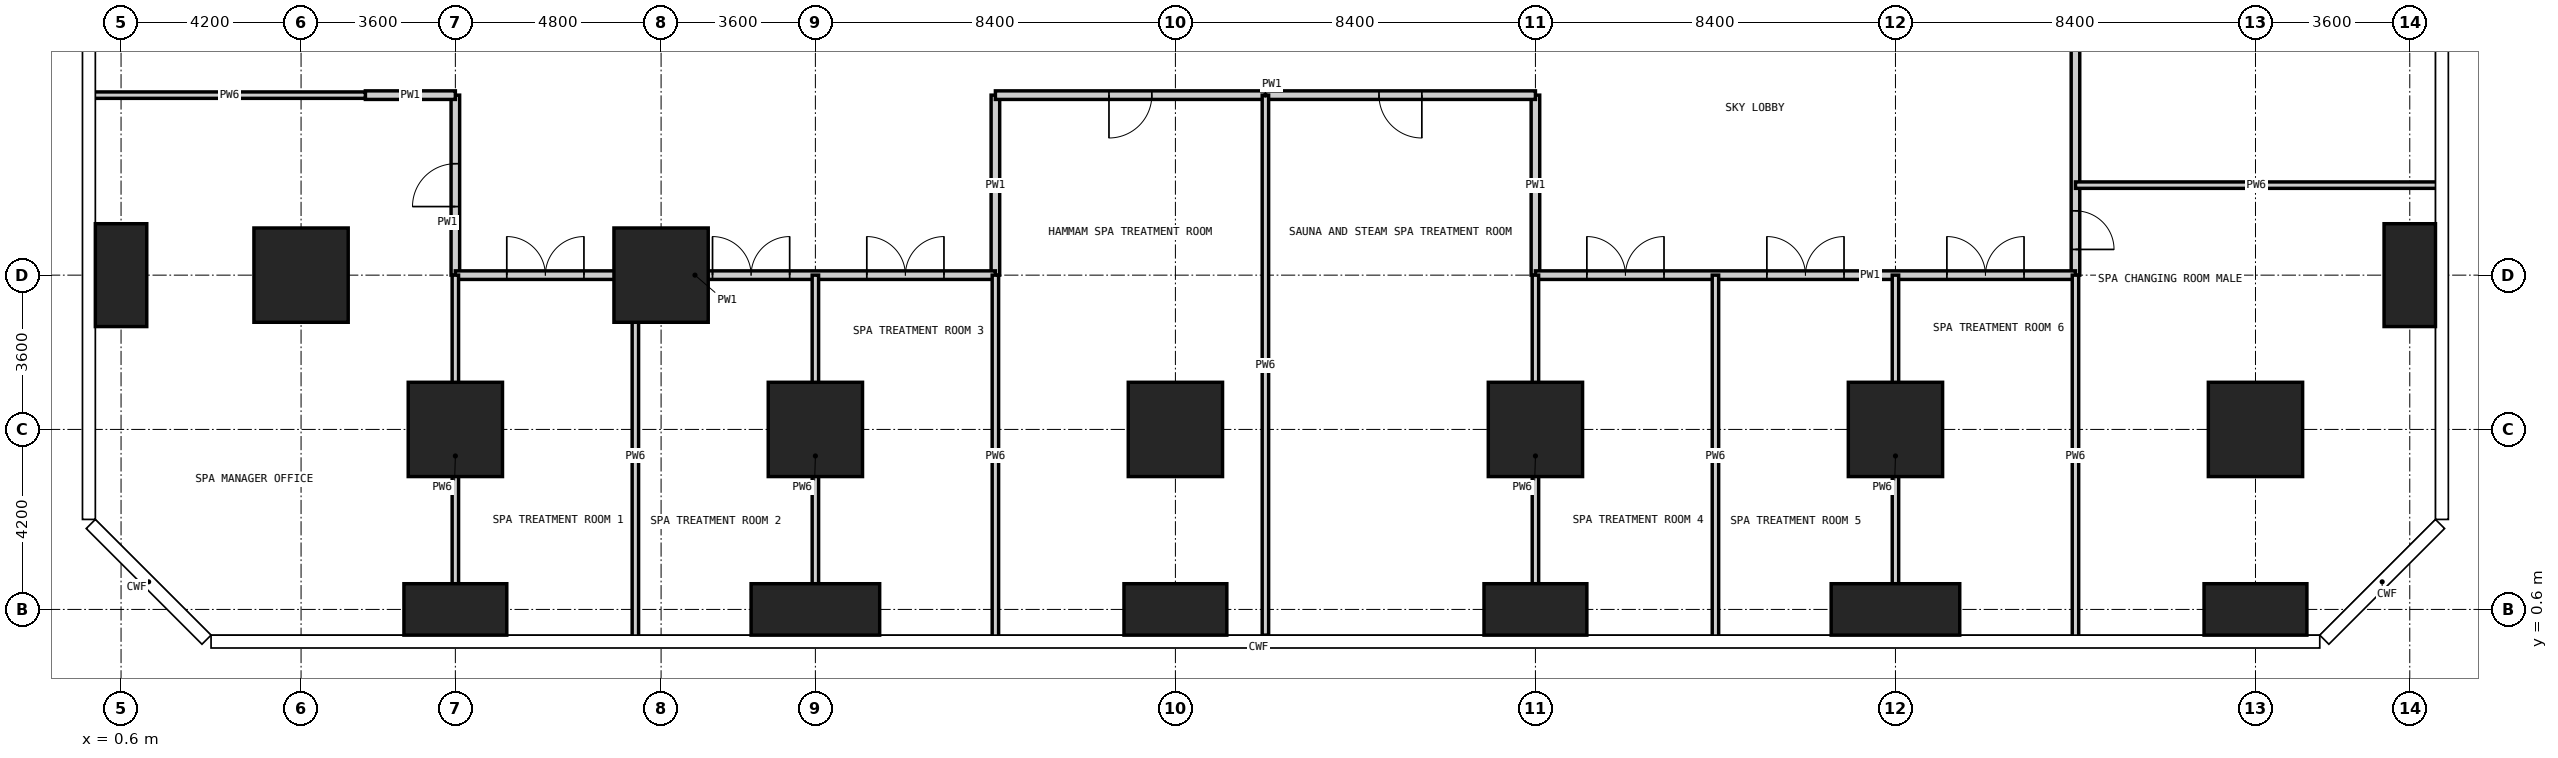
"""IFC4 building model, lengths in metres.
Left out: names, types, materials, properties, quantities, classifications, styles, units other than length and angle.
Written with IfcOpenShell. Run it as: python <this file> out.ifc"""

import sys

from ifc_helpers import new_model, si_unit, direction, frame, frame_2d, origin, origin_2d, place, context, subcontext, project, spatial, rectangle, extrude, element, fill, save


model = new_model("IFC4")
c1 = context("Model", 3, precision=1e-05, world=origin(), true_north=direction((0.0, 1.0)))
c2 = subcontext(c1, "Body", "Model", "MODEL_VIEW")
j1 = project(units=[si_unit("LENGTHUNIT", "METRE"), si_unit("PLANEANGLEUNIT", "RADIAN")], contexts=[c1])
p1 = place(None, origin())
s1 = spatial("IfcSite", under=j1, at=p1, CompositionType="ELEMENT")
p2 = place(p1, origin())
s2 = spatial("IfcBuilding", under=s1, at=p2, CompositionType="ELEMENT")
p3 = place(p2, frame((0.0, 0.0, 147.6)))
s3 = spatial("IfcBuildingStorey", under=s2, at=p3, CompositionType="ELEMENT", Elevation=147.6)
p4 = place(p3, frame((0.6, 8.4, -0.35), z_axis=(0.0, 0.0, 1.0), x_axis=(1.0, 0.0, 0.0)))
e1 = element("IfcColumn", 1, at=p4, inside=s3, PredefinedType="COLUMN", context=c2, shape_type="SweptSolid", body=[
    extrude(rectangle(XDim=1.2, YDim=2.4, at=origin_2d()), origin(), (0.0, 0.0, 1.0), 5.95),
])
p5 = place(p3, frame((4.8, 8.4, -0.35), z_axis=(0.0, 0.0, 1.0), x_axis=(1.0, 0.0, 0.0)))
e2 = element("IfcColumn", 2, at=p5, inside=s3, PredefinedType="COLUMN", context=c2, shape_type="SweptSolid", body=[
    extrude(rectangle(XDim=2.2, YDim=2.2, at=origin_2d()), origin(), (0.0, 0.0, 1.0), 5.95),
])
p6 = place(p3, frame((8.4, 0.6, -0.35), z_axis=(0.0, 0.0, 1.0), x_axis=(1.0, 0.0, 0.0)))
e3 = element("IfcColumn", 3, at=p6, inside=s3, PredefinedType="COLUMN", context=c2, shape_type="SweptSolid", body=[
    extrude(rectangle(XDim=2.4, YDim=1.2, at=origin_2d()), origin(), (0.0, 0.0, 1.0), 5.95),
])
for number, where, z_axis, x_axis in (
    (4, (8.4, 4.8, -0.35), (0.0, 0.0, 1.0), (1.0, 0.0, 0.0)),
    (5, (13.2, 8.4, -0.35), (0.0, 0.0, 1.0), (1.0, 0.0, 0.0)),
):
    element("IfcColumn", number, at=place(p3, frame(where, z_axis=z_axis, x_axis=x_axis)), inside=s3, PredefinedType="COLUMN", context=c2, shape_type="SweptSolid", body=[
        extrude(rectangle(XDim=2.2, YDim=2.2, at=origin_2d()), origin(), (0.0, 0.0, 1.0), 5.95),
    ])
p7 = place(p3, frame((16.8, 0.6, -0.35), z_axis=(0.0, 0.0, 1.0), x_axis=(1.0, 0.0, 0.0)))
e6 = element("IfcColumn", 6, at=p7, inside=s3, PredefinedType="COLUMN", context=c2, shape_type="SweptSolid", body=[
    extrude(rectangle(XDim=3.0, YDim=1.2, at=origin_2d()), origin(), (0.0, 0.0, 1.0), 5.95),
])
p8 = place(p3, frame((16.8, 4.8, -0.35), z_axis=(0.0, 0.0, 1.0), x_axis=(1.0, 0.0, 0.0)))
e7 = element("IfcColumn", 7, at=p8, inside=s3, PredefinedType="COLUMN", context=c2, shape_type="SweptSolid", body=[
    extrude(rectangle(XDim=2.2, YDim=2.2, at=origin_2d()), origin(), (0.0, 0.0, 1.0), 5.95),
])
p9 = place(p3, frame((25.2, 0.6, -0.35), z_axis=(0.0, 0.0, 1.0), x_axis=(1.0, 0.0, 0.0)))
e8 = element("IfcColumn", 8, at=p9, inside=s3, PredefinedType="COLUMN", context=c2, shape_type="SweptSolid", body=[
    extrude(rectangle(XDim=2.4, YDim=1.2, at=origin_2d()), origin(), (0.0, 0.0, 1.0), 5.95),
])
p10 = place(p3, frame((25.2, 4.8, -0.35), z_axis=(0.0, 0.0, 1.0), x_axis=(1.0, 0.0, 0.0)))
e9 = element("IfcColumn", 9, at=p10, inside=s3, PredefinedType="COLUMN", context=c2, shape_type="SweptSolid", body=[
    extrude(rectangle(XDim=2.2, YDim=2.2, at=origin_2d()), origin(), (0.0, 0.0, 1.0), 5.95),
])
p11 = place(p3, frame((33.6, 0.6, -0.35), z_axis=(0.0, 0.0, 1.0), x_axis=(1.0, 0.0, 0.0)))
e10 = element("IfcColumn", 10, at=p11, inside=s3, PredefinedType="COLUMN", context=c2, shape_type="SweptSolid", body=[
    extrude(rectangle(XDim=2.4, YDim=1.2, at=origin_2d()), origin(), (0.0, 0.0, 1.0), 5.95),
])
p12 = place(p3, frame((33.6, 4.8, -0.35), z_axis=(0.0, 0.0, 1.0), x_axis=(1.0, 0.0, 0.0)))
e11 = element("IfcColumn", 11, at=p12, inside=s3, PredefinedType="COLUMN", context=c2, shape_type="SweptSolid", body=[
    extrude(rectangle(XDim=2.2, YDim=2.2, at=origin_2d()), origin(), (0.0, 0.0, 1.0), 5.95),
])
p13 = place(p3, frame((42.0, 0.6, -0.35), z_axis=(0.0, 0.0, 1.0), x_axis=(1.0, 0.0, 0.0)))
e12 = element("IfcColumn", 12, at=p13, inside=s3, PredefinedType="COLUMN", context=c2, shape_type="SweptSolid", body=[
    extrude(rectangle(XDim=3.0, YDim=1.2, at=origin_2d()), origin(), (0.0, 0.0, 1.0), 5.95),
])
p14 = place(p3, frame((42.0, 4.8, -0.35), z_axis=(0.0, 0.0, 1.0), x_axis=(1.0, 0.0, 0.0)))
e13 = element("IfcColumn", 13, at=p14, inside=s3, PredefinedType="COLUMN", context=c2, shape_type="SweptSolid", body=[
    extrude(rectangle(XDim=2.2, YDim=2.2, at=origin_2d()), origin(), (0.0, 0.0, 1.0), 5.95),
])
p15 = place(p3, frame((50.4, 0.6, -0.35), z_axis=(0.0, 0.0, 1.0), x_axis=(1.0, 0.0, 0.0)))
e14 = element("IfcColumn", 14, at=p15, inside=s3, PredefinedType="COLUMN", context=c2, shape_type="SweptSolid", body=[
    extrude(rectangle(XDim=2.4, YDim=1.2, at=origin_2d()), origin(), (0.0, 0.0, 1.0), 5.95),
])
p16 = place(p3, frame((50.4, 4.8, -0.35), z_axis=(0.0, 0.0, 1.0), x_axis=(1.0, 0.0, 0.0)))
e15 = element("IfcColumn", 15, at=p16, inside=s3, PredefinedType="COLUMN", context=c2, shape_type="SweptSolid", body=[
    extrude(rectangle(XDim=2.2, YDim=2.2, at=origin_2d()), origin(), (0.0, 0.0, 1.0), 5.95),
])
p17 = place(p3, frame((54.0, 8.4, -0.35), z_axis=(0.0, 0.0, 1.0), x_axis=(1.0, 0.0, 0.0)))
e16 = element("IfcColumn", 16, at=p17, inside=s3, PredefinedType="COLUMN", context=c2, shape_type="SweptSolid", body=[
    extrude(rectangle(XDim=1.2, YDim=2.4, at=origin_2d()), origin(), (0.0, 0.0, 1.0), 5.95),
])
p18 = place(p3, frame((8.4, 8.4, 0.0), z_axis=(0.0, 0.0, 1.0), x_axis=(0.0, 1.0, 0.0)))
e17 = element("IfcWall", 17, at=p18, inside=s3, PredefinedType="PARTITIONING", context=c2, shape_type="SweptSolid", body=[
    extrude(rectangle(XDim=4.2, YDim=0.2, at=frame_2d((2.1, 0.0))), origin(), (0.0, 0.0, 1.0), 5.6),
])
p19 = place(p18, frame((1.6, 0.0, 0.0)))
e18 = element("IfcOpeningElement", 18, at=p19, cuts=e17, PredefinedType="OPENING", context=c2, shape_type="SweptSolid", body=[
    extrude(rectangle(XDim=1.0, YDim=2.1, at=frame_2d((0.5, 1.05))), frame((0.0, 0.11, 0.0), z_axis=(0.0, -1.0, 0.0), x_axis=(1.0, 0.0, 0.0)), (0.0, 0.0, 1.0), 0.22),
])
for number, where, z_axis, x_axis in (
    (19, (21.0, 8.4, 0.0), (0.0, 0.0, 1.0), (0.0, 1.0, 0.0)),
    (20, (33.6, 8.4, 0.0), (0.0, 0.0, 1.0), (0.0, 1.0, 0.0)),
):
    element("IfcWall", number, at=place(p3, frame(where, z_axis=z_axis, x_axis=x_axis)), inside=s3, PredefinedType="PARTITIONING", context=c2, shape_type="SweptSolid", body=[
        extrude(rectangle(XDim=4.2, YDim=0.2, at=frame_2d((2.1, 0.0))), origin(), (0.0, 0.0, 1.0), 5.6),
    ])
p20 = place(p3, frame((46.2, 8.4, 0.0), z_axis=(0.0, 0.0, 1.0), x_axis=(0.0, 1.0, 0.0)))
e21 = element("IfcWall", 21, at=p20, inside=s3, PredefinedType="PARTITIONING", context=c2, shape_type="SweptSolid", body=[
    extrude(rectangle(XDim=29.4, YDim=0.2, at=frame_2d((14.7, 0.0))), origin(), (0.0, 0.0, 1.0), 5.6),
])
p21 = place(p20, frame((0.6, 0.0, 0.0)))
e22 = element("IfcOpeningElement", 22, at=p21, cuts=e21, PredefinedType="OPENING", context=c2, shape_type="SweptSolid", body=[
    extrude(rectangle(XDim=0.9, YDim=2.1, at=frame_2d((0.45, 1.05))), frame((0.0, 0.11, 0.0), z_axis=(0.0, -1.0, 0.0), x_axis=(1.0, 0.0, 0.0)), (0.0, 0.0, 1.0), 0.22),
])
p22 = place(p20, frame((6.9, 0.0, 0.0)))
e23 = element("IfcOpeningElement", 23, at=p22, cuts=e21, PredefinedType="OPENING", context=c2, shape_type="SweptSolid", body=[
    extrude(rectangle(XDim=0.9, YDim=2.1, at=frame_2d((0.45, 1.05))), frame((0.0, 0.11, 0.0), z_axis=(0.0, -1.0, 0.0), x_axis=(1.0, 0.0, 0.0)), (0.0, 0.0, 1.0), 0.22),
])
p23 = place(p20, frame((18.4, 0.0, 0.0)))
e24 = element("IfcOpeningElement", 24, at=p23, cuts=e21, PredefinedType="OPENING", context=c2, shape_type="SweptSolid", body=[
    extrude(rectangle(XDim=1.0, YDim=2.1, at=frame_2d((0.5, 1.05))), frame((0.0, 0.11, 0.0), z_axis=(0.0, -1.0, 0.0), x_axis=(1.0, 0.0, 0.0)), (0.0, 0.0, 1.0), 0.22),
])
p24 = place(p20, frame((26.8, 0.0, 0.0)))
e25 = element("IfcOpeningElement", 25, at=p24, cuts=e21, PredefinedType="OPENING", context=c2, shape_type="SweptSolid", body=[
    extrude(rectangle(XDim=1.0, YDim=2.1, at=frame_2d((0.5, 1.05))), frame((0.0, 0.11, 0.0), z_axis=(0.0, -1.0, 0.0), x_axis=(1.0, 0.0, 0.0)), (0.0, 0.0, 1.0), 0.22),
])
p25 = place(p3, frame((8.4, 8.4, 0.0), z_axis=(0.0, 0.0, 1.0), x_axis=(1.0, 0.0, 0.0)))
e26 = element("IfcWall", 26, at=p25, inside=s3, PredefinedType="PARTITIONING", context=c2, shape_type="SweptSolid", body=[
    extrude(rectangle(XDim=12.6, YDim=0.2, at=frame_2d((6.3, 0.0))), origin(), (0.0, 0.0, 1.0), 5.6),
])
p26 = place(p25, frame((1.2, 0.0, 0.0)))
e27 = element("IfcOpeningElement", 27, at=p26, cuts=e26, PredefinedType="OPENING", context=c2, shape_type="SweptSolid", body=[
    extrude(rectangle(XDim=1.8, YDim=2.4, at=frame_2d((0.9, 1.2))), frame((0.0, 0.11, 0.0), z_axis=(0.0, -1.0, 0.0), x_axis=(1.0, 0.0, 0.0)), (0.0, 0.0, 1.0), 0.22),
])
p27 = place(p25, frame((6.0, 0.0, 0.0)))
e28 = element("IfcOpeningElement", 28, at=p27, cuts=e26, PredefinedType="OPENING", context=c2, shape_type="SweptSolid", body=[
    extrude(rectangle(XDim=1.8, YDim=2.4, at=frame_2d((0.9, 1.2))), frame((0.0, 0.11, 0.0), z_axis=(0.0, -1.0, 0.0), x_axis=(1.0, 0.0, 0.0)), (0.0, 0.0, 1.0), 0.22),
])
p28 = place(p25, frame((9.6, 0.0, 0.0)))
e29 = element("IfcOpeningElement", 29, at=p28, cuts=e26, PredefinedType="OPENING", context=c2, shape_type="SweptSolid", body=[
    extrude(rectangle(XDim=1.8, YDim=2.4, at=frame_2d((0.9, 1.2))), frame((0.0, 0.11, 0.0), z_axis=(0.0, -1.0, 0.0), x_axis=(1.0, 0.0, 0.0)), (0.0, 0.0, 1.0), 0.22),
])
p29 = place(p3, frame((33.6, 8.4, 0.0), z_axis=(0.0, 0.0, 1.0), x_axis=(1.0, 0.0, 0.0)))
e30 = element("IfcWall", 30, at=p29, inside=s3, PredefinedType="PARTITIONING", context=c2, shape_type="SweptSolid", body=[
    extrude(rectangle(XDim=12.6, YDim=0.2, at=frame_2d((6.3, 0.0))), origin(), (0.0, 0.0, 1.0), 5.6),
])
p30 = place(p29, frame((1.2, 0.0, 0.0)))
e31 = element("IfcOpeningElement", 31, at=p30, cuts=e30, PredefinedType="OPENING", context=c2, shape_type="SweptSolid", body=[
    extrude(rectangle(XDim=1.8, YDim=2.4, at=frame_2d((0.9, 1.2))), frame((0.0, 0.11, 0.0), z_axis=(0.0, -1.0, 0.0), x_axis=(1.0, 0.0, 0.0)), (0.0, 0.0, 1.0), 0.22),
])
p31 = place(p29, frame((5.4, 0.0, 0.0)))
e32 = element("IfcOpeningElement", 32, at=p31, cuts=e30, PredefinedType="OPENING", context=c2, shape_type="SweptSolid", body=[
    extrude(rectangle(XDim=1.8, YDim=2.4, at=frame_2d((0.9, 1.2))), frame((0.0, 0.11, 0.0), z_axis=(0.0, -1.0, 0.0), x_axis=(1.0, 0.0, 0.0)), (0.0, 0.0, 1.0), 0.22),
])
p32 = place(p29, frame((9.6, 0.0, 0.0)))
e33 = element("IfcOpeningElement", 33, at=p32, cuts=e30, PredefinedType="OPENING", context=c2, shape_type="SweptSolid", body=[
    extrude(rectangle(XDim=1.8, YDim=2.4, at=frame_2d((0.9, 1.2))), frame((0.0, 0.11, 0.0), z_axis=(0.0, -1.0, 0.0), x_axis=(1.0, 0.0, 0.0)), (0.0, 0.0, 1.0), 0.22),
])
p33 = place(p3, frame((6.3, 12.6, 0.0), z_axis=(0.0, 0.0, 1.0), x_axis=(1.0, 0.0, 0.0)))
e34 = element("IfcWall", 34, at=p33, inside=s3, PredefinedType="PARTITIONING", context=c2, shape_type="SweptSolid", body=[
    extrude(rectangle(XDim=2.1, YDim=0.2, at=frame_2d((1.05, 0.0))), origin(), (0.0, 0.0, 1.0), 5.6),
])
p34 = place(p3, frame((21.0, 12.6, 0.0), z_axis=(0.0, 0.0, 1.0), x_axis=(1.0, 0.0, 0.0)))
e35 = element("IfcWall", 35, at=p34, inside=s3, PredefinedType="PARTITIONING", context=c2, shape_type="SweptSolid", body=[
    extrude(rectangle(XDim=12.6, YDim=0.2, at=frame_2d((6.3, 0.0))), origin(), (0.0, 0.0, 1.0), 5.6),
])
p35 = place(p34, frame((2.65, 0.0, 0.0)))
e36 = element("IfcOpeningElement", 36, at=p35, cuts=e35, PredefinedType="OPENING", context=c2, shape_type="SweptSolid", body=[
    extrude(rectangle(XDim=1.0, YDim=2.1, at=frame_2d((0.5, 1.05))), frame((0.0, 0.11, 0.0), z_axis=(0.0, -1.0, 0.0), x_axis=(1.0, 0.0, 0.0)), (0.0, 0.0, 1.0), 0.22),
])
p36 = place(p34, frame((8.95, 0.0, 0.0)))
e37 = element("IfcOpeningElement", 37, at=p36, cuts=e35, PredefinedType="OPENING", context=c2, shape_type="SweptSolid", body=[
    extrude(rectangle(XDim=1.0, YDim=2.1, at=frame_2d((0.5, 1.05))), frame((0.0, 0.11, 0.0), z_axis=(0.0, -1.0, 0.0), x_axis=(1.0, 0.0, 0.0)), (0.0, 0.0, 1.0), 0.22),
])
for number, where, z_axis, x_axis in (
    (38, (8.4, -0.038, 0.0), (0.0, 0.0, 1.0), (0.0, 1.0, 0.0)),
    (39, (12.6, -0.038, 0.0), (0.0, 0.0, 1.0), (0.0, 1.0, 0.0)),
    (40, (16.8, -0.038, 0.0), (0.0, 0.0, 1.0), (0.0, 1.0, 0.0)),
    (41, (21.0, -0.038, 0.0), (0.0, 0.0, 1.0), (0.0, 1.0, 0.0)),
):
    element("IfcWall", number, at=place(p3, frame(where, z_axis=z_axis, x_axis=x_axis)), inside=s3, PredefinedType="PARTITIONING", context=c2, shape_type="SweptSolid", body=[
        extrude(rectangle(XDim=8.438, YDim=0.15, at=frame_2d((4.219, 0.0))), origin(), (0.0, 0.0, 1.0), 5.6),
    ])
p37 = place(p3, frame((27.3, 0.0, 0.0), z_axis=(0.0, 0.0, 1.0), x_axis=(0.0, 1.0, 0.0)))
e42 = element("IfcWall", 42, at=p37, inside=s3, PredefinedType="PARTITIONING", context=c2, shape_type="SweptSolid", body=[
    extrude(rectangle(XDim=12.6, YDim=0.15, at=frame_2d((6.3, 0.0))), origin(), (0.0, 0.0, 1.0), 5.6),
])
for number, where, z_axis, x_axis in (
    (43, (33.6, -0.038, 0.0), (0.0, 0.0, 1.0), (0.0, 1.0, 0.0)),
    (44, (37.8, -0.038, 0.0), (0.0, 0.0, 1.0), (0.0, 1.0, 0.0)),
    (45, (42.0, -0.038, 0.0), (0.0, 0.0, 1.0), (0.0, 1.0, 0.0)),
    (46, (46.2, -0.038, 0.0), (0.0, 0.0, 1.0), (0.0, 1.0, 0.0)),
    (47, (46.2, 10.5, 0.0), (0.0, 0.0, 1.0), (1.0, 0.0, 0.0)),
):
    element("IfcWall", number, at=place(p3, frame(where, z_axis=z_axis, x_axis=x_axis)), inside=s3, PredefinedType="PARTITIONING", context=c2, shape_type="SweptSolid", body=[
        extrude(rectangle(XDim=8.438, YDim=0.15, at=frame_2d((4.219, 0.0))), origin(), (0.0, 0.0, 1.0), 5.6),
    ])
p38 = place(p3, frame((-0.038, 12.6, 0.0), z_axis=(0.0, 0.0, 1.0), x_axis=(1.0, 0.0, 0.0)))
e48 = element("IfcWall", 48, at=p38, inside=s3, PredefinedType="PARTITIONING", context=c2, shape_type="SweptSolid", body=[
    extrude(rectangle(XDim=6.338, YDim=0.15, at=frame_2d((3.169, 0.0))), origin(), (0.0, 0.0, 1.0), 5.6),
])
p39 = place(p19, origin())
e49 = element("IfcDoor", 49, at=p39, inside=s3, OperationType="SINGLE_SWING_LEFT", PredefinedType="DOOR", context=c2, shape_type="SweptSolid", body=[
    extrude(rectangle(XDim=1.0, YDim=2.1, at=frame_2d((0.5, 1.05))), frame((0.0, 0.025, 0.0), z_axis=(0.0, -1.0, 0.0), x_axis=(1.0, 0.0, 0.0)), (0.0, 0.0, 1.0), 0.05),
])
fill(e18, e49)
p40 = place(p26, origin())
e50 = element("IfcDoor", 50, at=p40, inside=s3, OperationType="DOUBLE_DOOR_DOUBLE_SWING", PredefinedType="DOOR", context=c2, shape_type="SweptSolid", body=[
    extrude(rectangle(XDim=1.8, YDim=2.4, at=frame_2d((0.9, 1.2))), frame((0.0, 0.025, 0.0), z_axis=(0.0, -1.0, 0.0), x_axis=(1.0, 0.0, 0.0)), (0.0, 0.0, 1.0), 0.05),
])
fill(e27, e50)
p41 = place(p27, origin())
e51 = element("IfcDoor", 51, at=p41, inside=s3, OperationType="DOUBLE_DOOR_DOUBLE_SWING", PredefinedType="DOOR", context=c2, shape_type="SweptSolid", body=[
    extrude(rectangle(XDim=1.8, YDim=2.4, at=frame_2d((0.9, 1.2))), frame((0.0, 0.025, 0.0), z_axis=(0.0, -1.0, 0.0), x_axis=(1.0, 0.0, 0.0)), (0.0, 0.0, 1.0), 0.05),
])
fill(e28, e51)
p42 = place(p28, origin())
e52 = element("IfcDoor", 52, at=p42, inside=s3, OperationType="DOUBLE_DOOR_DOUBLE_SWING", PredefinedType="DOOR", context=c2, shape_type="SweptSolid", body=[
    extrude(rectangle(XDim=1.8, YDim=2.4, at=frame_2d((0.9, 1.2))), frame((0.0, 0.025, 0.0), z_axis=(0.0, -1.0, 0.0), x_axis=(1.0, 0.0, 0.0)), (0.0, 0.0, 1.0), 0.05),
])
fill(e29, e52)
p43 = place(p30, origin())
e53 = element("IfcDoor", 53, at=p43, inside=s3, OperationType="DOUBLE_DOOR_DOUBLE_SWING", PredefinedType="DOOR", context=c2, shape_type="SweptSolid", body=[
    extrude(rectangle(XDim=1.8, YDim=2.4, at=frame_2d((0.9, 1.2))), frame((0.0, 0.025, 0.0), z_axis=(0.0, -1.0, 0.0), x_axis=(1.0, 0.0, 0.0)), (0.0, 0.0, 1.0), 0.05),
])
fill(e31, e53)
p44 = place(p31, origin())
e54 = element("IfcDoor", 54, at=p44, inside=s3, OperationType="DOUBLE_DOOR_DOUBLE_SWING", PredefinedType="DOOR", context=c2, shape_type="SweptSolid", body=[
    extrude(rectangle(XDim=1.8, YDim=2.4, at=frame_2d((0.9, 1.2))), frame((0.0, 0.025, 0.0), z_axis=(0.0, -1.0, 0.0), x_axis=(1.0, 0.0, 0.0)), (0.0, 0.0, 1.0), 0.05),
])
fill(e32, e54)
p45 = place(p32, origin())
e55 = element("IfcDoor", 55, at=p45, inside=s3, OperationType="DOUBLE_DOOR_DOUBLE_SWING", PredefinedType="DOOR", context=c2, shape_type="SweptSolid", body=[
    extrude(rectangle(XDim=1.8, YDim=2.4, at=frame_2d((0.9, 1.2))), frame((0.0, 0.025, 0.0), z_axis=(0.0, -1.0, 0.0), x_axis=(1.0, 0.0, 0.0)), (0.0, 0.0, 1.0), 0.05),
])
fill(e33, e55)
p46 = place(p35, frame((1.0, 0.0, 0.0), z_axis=(0.0, 0.0, 1.0), x_axis=(-1.0, 0.0, 0.0)))
e56 = element("IfcDoor", 56, at=p46, inside=s3, OperationType="SINGLE_SWING_RIGHT", PredefinedType="DOOR", context=c2, shape_type="SweptSolid", body=[
    extrude(rectangle(XDim=1.0, YDim=2.1, at=frame_2d((0.5, 1.05))), frame((0.0, 0.025, 0.0), z_axis=(0.0, -1.0, 0.0), x_axis=(1.0, 0.0, 0.0)), (0.0, 0.0, 1.0), 0.05),
])
fill(e36, e56)
p47 = place(p36, frame((1.0, 0.0, 0.0), z_axis=(0.0, 0.0, 1.0), x_axis=(-1.0, 0.0, 0.0)))
e57 = element("IfcDoor", 57, at=p47, inside=s3, OperationType="SINGLE_SWING_LEFT", PredefinedType="DOOR", context=c2, shape_type="SweptSolid", body=[
    extrude(rectangle(XDim=1.0, YDim=2.1, at=frame_2d((0.5, 1.05))), frame((0.0, 0.025, 0.0), z_axis=(0.0, -1.0, 0.0), x_axis=(1.0, 0.0, 0.0)), (0.0, 0.0, 1.0), 0.05),
])
fill(e37, e57)
p48 = place(p21, frame((0.9, 0.0, 0.0), z_axis=(0.0, 0.0, 1.0), x_axis=(-1.0, 0.0, 0.0)))
e58 = element("IfcDoor", 58, at=p48, inside=s3, OperationType="SINGLE_SWING_RIGHT", PredefinedType="DOOR", context=c2, shape_type="SweptSolid", body=[
    extrude(rectangle(XDim=0.9, YDim=2.1, at=frame_2d((0.45, 1.05))), frame((0.0, 0.025, 0.0), z_axis=(0.0, -1.0, 0.0), x_axis=(1.0, 0.0, 0.0)), (0.0, 0.0, 1.0), 0.05),
])
fill(e22, e58)
save(model, sys.argv[1])
